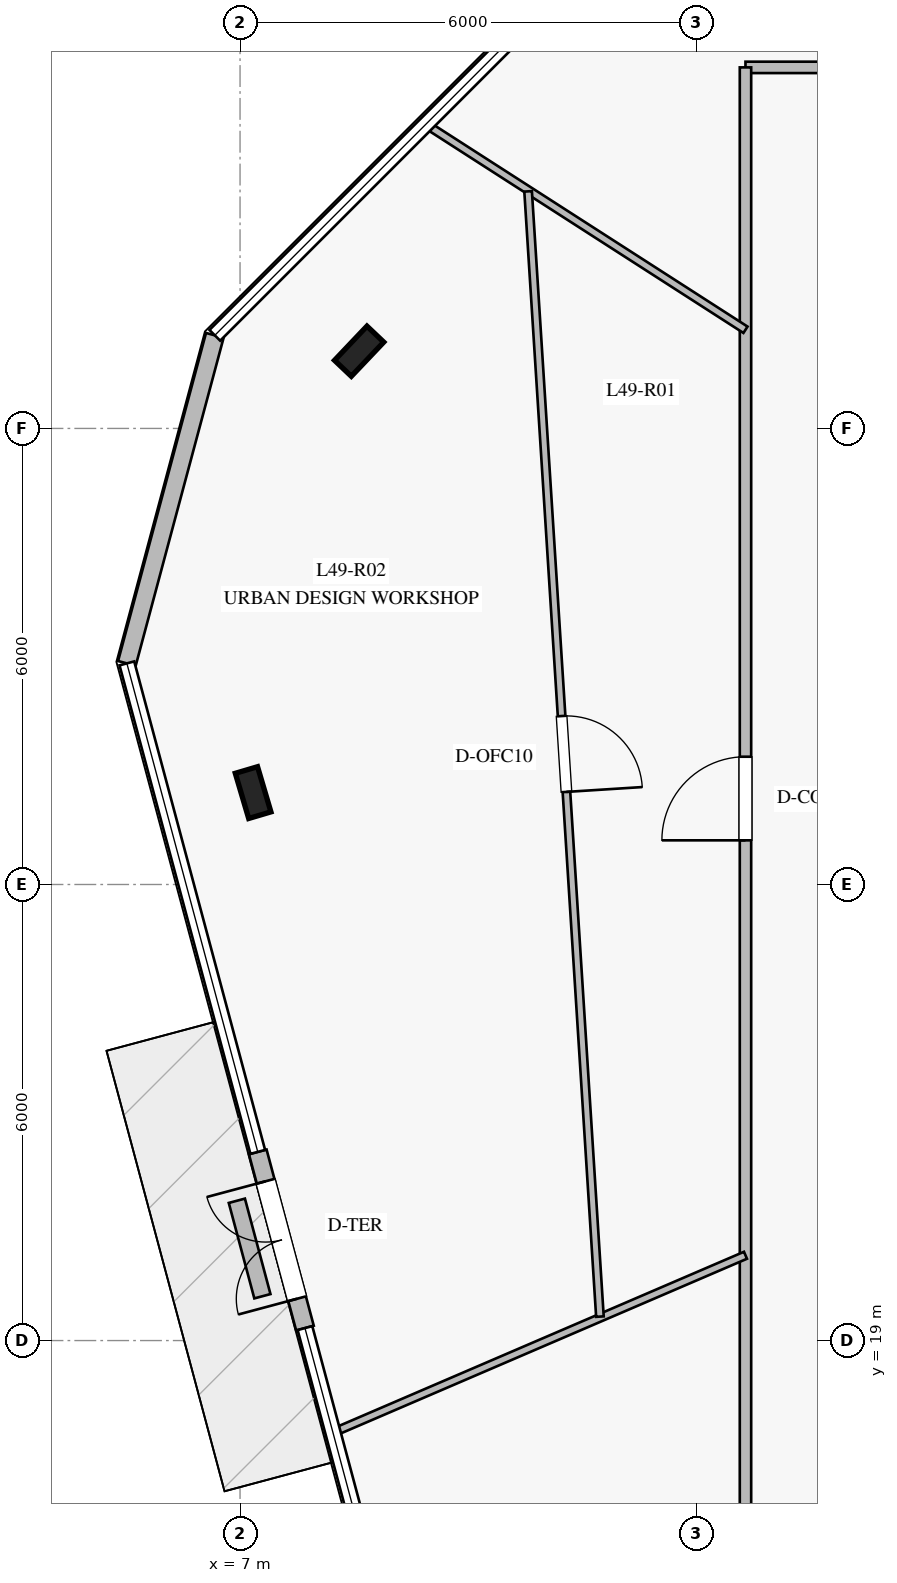
"""IFC4 building model, lengths in metres.
Left out: names, types, materials, properties, quantities, classifications, styles, units other than length and angle.
Written with IfcOpenShell. Run it as: python <this file> out.ifc"""

import sys

from ifc_helpers import new_model, si_unit, direction, frame, frame_2d, origin, origin_2d, place, context, subcontext, project, spatial, rectangle, i_section, extrude, element, fill, save


model = new_model("IFC4")
c1 = context("Model", 3, precision=1e-05, world=origin(), true_north=direction((0.0, 1.0)))
c2 = subcontext(c1, "Body", "Model", "MODEL_VIEW")
j1 = project(units=[si_unit("LENGTHUNIT", "METRE"), si_unit("PLANEANGLEUNIT", "RADIAN")], contexts=[c1])
p1 = place(None, origin())
s1 = spatial("IfcSite", under=j1, at=p1, CompositionType="ELEMENT")
p2 = place(p1, origin())
s2 = spatial("IfcBuilding", under=s1, at=p2, CompositionType="ELEMENT")
p3 = place(p2, frame((0.0, 0.0, 204.8)))
s3 = spatial("IfcBuildingStorey", under=s2, at=p3, CompositionType="ELEMENT", Elevation=204.8)
for number, where, z_axis, x_axis in (
    (1, (8.567, 32.016, 0.0), (0.0, 0.0, 1.0), (0.688, 0.725, 0.0)),
    (2, (7.172, 26.209, 0.0), (0.0, 0.0, 1.0), (-0.284, 0.959, 0.0)),
):
    element("IfcColumn", number, at=place(p3, frame(where, z_axis=z_axis, x_axis=x_axis)), inside=s3, PredefinedType="COLUMN", context=c2, shape_type="SweptSolid", body=[
        extrude(i_section(OverallWidth=0.305, OverallDepth=0.62, WebThickness=0.021, FlangeThickness=0.04, at=origin_2d()), origin(), (0.0, 0.0, 1.0), 4.0),
    ])
p4 = place(p3, frame((6.668, 32.225, 0.0), z_axis=(0.0, 0.0, 1.0), x_axis=(-0.258917234221, -0.965899511245, 0.0)))
e3 = element("IfcWall", 3, at=p4, inside=s3, PredefinedType="STANDARD", context=c2, shape_type="SweptSolid", body=[
    extrude(rectangle(XDim=4.469, YDim=0.24, at=frame_2d((2.234, 0.0))), origin(), (0.0, 0.0, 1.0), 3.78),
])
p5 = place(p3, frame((7.233, 21.482, 0.0), z_axis=(0.0, 0.0, 1.0), x_axis=(0.258827623195, -0.965923527755, 0.0)))
e4 = element("IfcWall", 4, at=p5, inside=s3, PredefinedType="STANDARD", context=c2, shape_type="SweptSolid", body=[
    extrude(rectangle(XDim=2.4, YDim=0.24, at=frame_2d((1.2, 0.0))), origin(), (0.0, 0.0, 1.0), 3.78),
])
p6 = place(p5, frame((0.4, 0.0, 0.0)))
e5 = element("IfcOpeningElement", 5, at=p6, cuts=e4, PredefinedType="OPENING", context=c2, shape_type="SweptSolid", body=[
    extrude(rectangle(XDim=1.6, YDim=2.25, at=frame_2d((0.8, 1.125))), frame((0.0, 0.13, 0.0), z_axis=(0.0, -1.0, 0.0), x_axis=(1.0, 0.0, 0.0)), (0.0, 0.0, 1.0), 0.26),
])
p7 = place(p3, frame((6.958, 20.839, 0.0), z_axis=(0.0, 0.0, 1.0), x_axis=(0.258363777467, -0.966047699906, 0.0)))
e6 = element("IfcWall", 6, at=p7, inside=s3, PredefinedType="USERDEFINED", context=c2, shape_type="SweptSolid", body=[
    extrude(rectangle(XDim=1.3, YDim=0.22, at=frame_2d((0.65, 0.0))), origin(), (0.0, 0.0, 1.0), 0.4),
])
p8 = place(p3, frame((13.65, 35.75, 0.0), z_axis=(0.0, 0.0, 1.0), x_axis=(1.0, 0.0, 0.0)))
e7 = element("IfcWall", 7, at=p8, inside=s3, PredefinedType="PARTITIONING", context=c2, shape_type="SweptSolid", body=[
    extrude(rectangle(XDim=22.7, YDim=0.15, at=frame_2d((11.35, 0.0))), origin(), (0.0, 0.0, 1.0), 3.05),
])
p9 = place(p8, frame((20.768, 0.0, 0.0)))
e8 = element("IfcOpeningElement", 8, at=p9, cuts=e7, PredefinedType="OPENING", context=c2, shape_type="SweptSolid", body=[
    extrude(rectangle(XDim=1.1, YDim=2.2, at=frame_2d((0.55, 1.1))), frame((0.0, 0.085, 0.0), z_axis=(0.0, -1.0, 0.0), x_axis=(1.0, 0.0, 0.0)), (0.0, 0.0, 1.0), 0.17),
])
p10 = place(p8, frame((14.301, 0.0, 0.0)))
e9 = element("IfcOpeningElement", 9, at=p10, cuts=e7, PredefinedType="OPENING", context=c2, shape_type="SweptSolid", body=[
    extrude(rectangle(XDim=1.1, YDim=2.2, at=frame_2d((0.55, 1.1))), frame((0.0, 0.085, 0.0), z_axis=(0.0, -1.0, 0.0), x_axis=(1.0, 0.0, 0.0)), (0.0, 0.0, 1.0), 0.17),
])
p11 = place(p8, frame((4.412, 0.0, 0.0)))
e10 = element("IfcOpeningElement", 10, at=p11, cuts=e7, PredefinedType="OPENING", context=c2, shape_type="SweptSolid", body=[
    extrude(rectangle(XDim=1.1, YDim=2.2, at=frame_2d((0.55, 1.1))), frame((0.0, 0.085, 0.0), z_axis=(0.0, -1.0, 0.0), x_axis=(1.0, 0.0, 0.0)), (0.0, 0.0, 1.0), 0.17),
])
p12 = place(p3, frame((13.65, 14.25, 0.0), z_axis=(0.0, 0.0, 1.0), x_axis=(0.0, 1.0, 0.0)))
e11 = element("IfcWall", 11, at=p12, inside=s3, PredefinedType="PARTITIONING", context=c2, shape_type="SweptSolid", body=[
    extrude(rectangle(XDim=21.5, YDim=0.15, at=frame_2d((10.75, 0.0))), origin(), (0.0, 0.0, 1.0), 3.02),
])
p13 = place(p12, frame((11.331, 0.0, 0.0)))
e12 = element("IfcOpeningElement", 12, at=p13, cuts=e11, PredefinedType="OPENING", context=c2, shape_type="SweptSolid", body=[
    extrude(rectangle(XDim=1.1, YDim=2.2, at=frame_2d((0.55, 1.1))), frame((0.0, 0.085, 0.0), z_axis=(0.0, -1.0, 0.0), x_axis=(1.0, 0.0, 0.0)), (0.0, 0.0, 1.0), 0.17),
])
p14 = place(p3, frame((13.65, 32.298, 0.0), z_axis=(0.0, 0.0, 1.0), x_axis=(-0.841207133727, 0.540713009061, 0.0)))
e13 = element("IfcWall", 13, at=p14, inside=s3, PredefinedType="MOVABLE", context=c2, shape_type="SweptSolid", body=[
    extrude(rectangle(XDim=4.982, YDim=0.1, at=frame_2d((2.491, 0.0))), origin(), (0.0, 0.0, 1.0), 3.05),
])
p15 = place(p3, frame((13.65, 20.122, 0.0), z_axis=(0.0, 0.0, 1.0), x_axis=(-0.918666330023, -0.395034396074, 0.0)))
e14 = element("IfcWall", 14, at=p15, inside=s3, PredefinedType="MOVABLE", context=c2, shape_type="SweptSolid", body=[
    extrude(rectangle(XDim=5.891, YDim=0.1, at=frame_2d((2.946, 0.0))), origin(), (0.0, 0.0, 1.0), 3.02),
])
p16 = place(p3, frame((10.79, 34.119, 0.0), z_axis=(0.0, 0.0, 1.0), x_axis=(0.063709221748, -0.997968504044, 0.0)))
e15 = element("IfcWall", 15, at=p16, inside=s3, PredefinedType="MOVABLE", context=c2, shape_type="SweptSolid", body=[
    extrude(rectangle(XDim=14.834, YDim=0.1, at=frame_2d((7.417, 0.0))), origin(), (0.0, 0.0, 1.0), 3.02),
])
p17 = place(p16, frame((6.917, 0.0, 0.0)))
e16 = element("IfcOpeningElement", 16, at=p17, cuts=e15, PredefinedType="OPENING", context=c2, shape_type="SweptSolid", body=[
    extrude(rectangle(XDim=1.0, YDim=2.15, at=frame_2d((0.5, 1.075))), frame((0.0, 0.06, 0.0), z_axis=(0.0, -1.0, 0.0), x_axis=(1.0, 0.0, 0.0)), (0.0, 0.0, 1.0), 0.12),
])
p18 = place(p6, frame((1.6, 0.0, 0.0), z_axis=(0.0, 0.0, 1.0), x_axis=(-1.0, 0.0, 0.0)))
e17 = element("IfcDoor", 17, at=p18, inside=s3, OperationType="DOUBLE_DOOR_SINGLE_SWING", PredefinedType="DOOR", context=c2, shape_type="SweptSolid", body=[
    extrude(rectangle(XDim=1.6, YDim=2.25, at=frame_2d((0.8, 1.125))), frame((0.0, 0.025, 0.0), z_axis=(0.0, -1.0, 0.0), x_axis=(1.0, 0.0, 0.0)), (0.0, 0.0, 1.0), 0.05),
])
fill(e5, e17)
p19 = place(p13, origin())
e18 = element("IfcDoor", 18, at=p19, inside=s3, OperationType="SINGLE_SWING_LEFT", PredefinedType="DOOR", context=c2, shape_type="SweptSolid", body=[
    extrude(rectangle(XDim=1.1, YDim=2.2, at=frame_2d((0.55, 1.1))), frame((0.0, 0.025, 0.0), z_axis=(0.0, -1.0, 0.0), x_axis=(1.0, 0.0, 0.0)), (0.0, 0.0, 1.0), 0.05),
])
fill(e12, e18)
p20 = place(p17, origin())
e19 = element("IfcDoor", 19, at=p20, inside=s3, OperationType="SINGLE_SWING_RIGHT", PredefinedType="DOOR", context=c2, shape_type="SweptSolid", body=[
    extrude(rectangle(XDim=1.0, YDim=2.15, at=frame_2d((0.5, 1.075))), frame((0.0, 0.025, 0.0), z_axis=(0.0, -1.0, 0.0), x_axis=(1.0, 0.0, 0.0)), (0.0, 0.0, 1.0), 0.05),
])
fill(e16, e19)
save(model, sys.argv[1])
